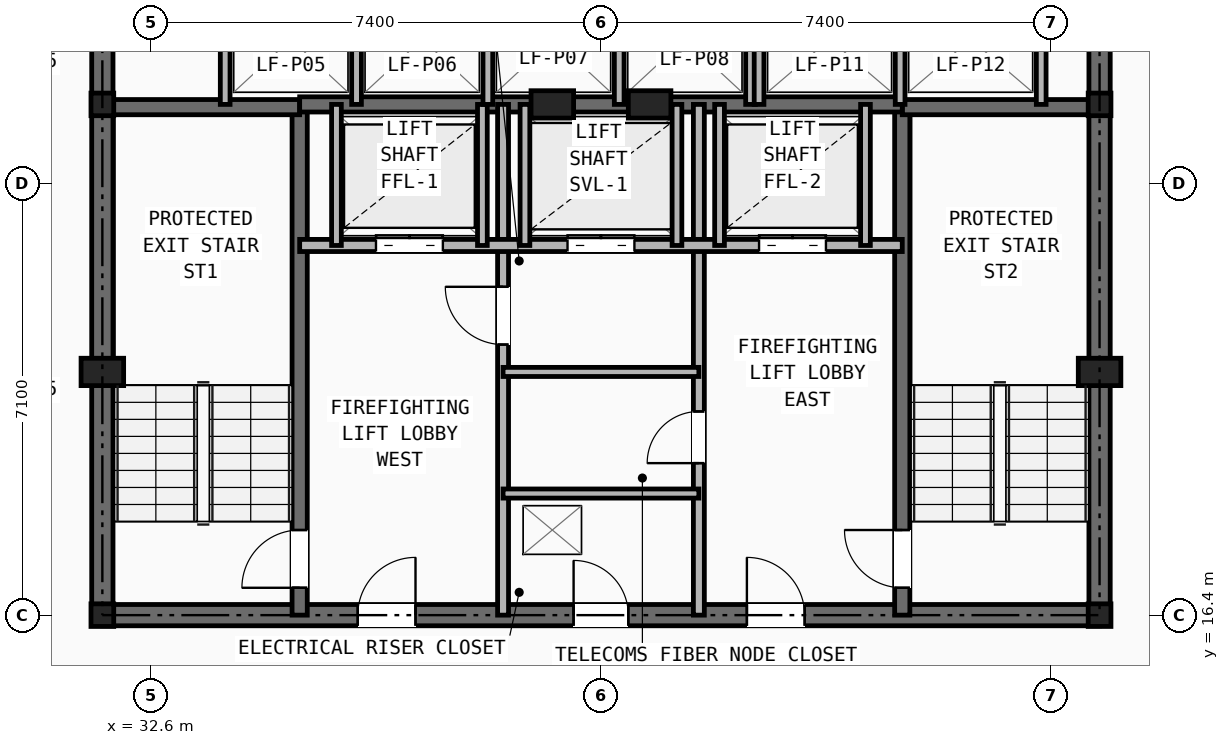
"""IFC4 building model, lengths in metres.
Left out: names, types, materials, properties, quantities, classifications, styles, units other than length and angle.
Written with IfcOpenShell. Run it as: python <this file> out.ifc"""

import sys

from ifc_helpers import new_model, si_unit, direction, frame, frame_2d, origin, origin_2d, place, context, subcontext, project, spatial, rectangle, i_section, extrude, element, fill, save


model = new_model("IFC4")
c1 = context("Model", 3, precision=1e-05, world=origin(), true_north=direction((0.0, 1.0)))
c2 = subcontext(c1, "Body", "Model", "MODEL_VIEW")
j1 = project(units=[si_unit("LENGTHUNIT", "METRE"), si_unit("PLANEANGLEUNIT", "RADIAN")], contexts=[c1])
p1 = place(None, origin())
s1 = spatial("IfcSite", under=j1, at=p1, CompositionType="ELEMENT")
p2 = place(p1, origin())
s2 = spatial("IfcBuilding", under=s1, at=p2, CompositionType="ELEMENT")
p3 = place(p2, frame((0.0, 0.0, 86.2)))
s3 = spatial("IfcBuildingStorey", under=s2, at=p3, CompositionType="ELEMENT", Elevation=86.2)
for number, where, z_axis, x_axis in (
    (1, (31.8, 16.4, 0.0), (0.0, 0.0, 1.0), (1.0, 0.0, 0.0)),
    (2, (48.2, 16.4, 0.0), (0.0, 0.0, 1.0), (1.0, 0.0, 0.0)),
    (3, (31.8, 24.8, 0.0), (0.0, 0.0, 1.0), (1.0, 0.0, 0.0)),
    (4, (48.2, 24.8, 0.0), (0.0, 0.0, 1.0), (1.0, 0.0, 0.0)),
):
    element("IfcColumn", number, at=place(p3, frame(where, z_axis=z_axis, x_axis=x_axis)), inside=s3, PredefinedType="COLUMN", context=c2, shape_type="SweptSolid", body=[
        extrude(i_section(OverallWidth=0.374, OverallDepth=0.372, WebThickness=0.016, FlangeThickness=0.026, at=origin_2d()), origin(), (0.0, 0.0, 1.0), 3.2),
    ])
for number, where, z_axis, x_axis in (
    (5, (31.8, 20.4, 0.0), (0.0, 0.0, 1.0), (1.0, 0.0, 0.0)),
    (6, (48.2, 20.4, 0.0), (0.0, 0.0, 1.0), (1.0, 0.0, 0.0)),
    (7, (39.2, 24.8, 0.0), (0.0, 0.0, 1.0), (1.0, 0.0, 0.0)),
    (8, (40.8, 24.8, 0.0), (0.0, 0.0, 1.0), (1.0, 0.0, 0.0)),
):
    element("IfcColumn", number, at=place(p3, frame(where, z_axis=z_axis, x_axis=x_axis)), inside=s3, PredefinedType="PILASTER", context=c2, shape_type="SweptSolid", body=[
        extrude(rectangle(XDim=0.7, YDim=0.45, at=origin_2d()), origin(), (0.0, 0.0, 1.0), 3.2),
    ])
p4 = place(p3, frame((31.8, 16.4, 0.0), z_axis=(0.0, 0.0, 1.0), x_axis=(1.0, 0.0, 0.0)))
e9 = element("IfcWall", 9, at=p4, inside=s3, PredefinedType="SHEAR", context=c2, shape_type="SweptSolid", body=[
    extrude(rectangle(XDim=16.4, YDim=0.35, at=frame_2d((8.2, 0.0))), origin(), (0.0, 0.0, 1.0), 2.97),
])
p5 = place(p4, frame((7.75, 0.0, 0.0)))
e10 = element("IfcOpeningElement", 10, at=p5, cuts=e9, PredefinedType="OPENING", context=c2, shape_type="SweptSolid", body=[
    extrude(rectangle(XDim=0.9, YDim=2.1, at=frame_2d((0.45, 1.05))), frame((0.0, 0.185, 0.0), z_axis=(0.0, -1.0, 0.0), x_axis=(1.0, 0.0, 0.0)), (0.0, 0.0, 1.0), 0.37),
])
p6 = place(p4, frame((4.2, 0.0, 0.0)))
e11 = element("IfcOpeningElement", 11, at=p6, cuts=e9, PredefinedType="OPENING", context=c2, shape_type="SweptSolid", body=[
    extrude(rectangle(XDim=0.95, YDim=2.1, at=frame_2d((0.475, 1.05))), frame((0.0, 0.185, 0.0), z_axis=(0.0, -1.0, 0.0), x_axis=(1.0, 0.0, 0.0)), (0.0, 0.0, 1.0), 0.37),
])
p7 = place(p4, frame((10.6, 0.0, 0.0)))
e12 = element("IfcOpeningElement", 12, at=p7, cuts=e9, PredefinedType="OPENING", context=c2, shape_type="SweptSolid", body=[
    extrude(rectangle(XDim=0.95, YDim=2.1, at=frame_2d((0.475, 1.05))), frame((0.0, 0.185, 0.0), z_axis=(0.0, -1.0, 0.0), x_axis=(1.0, 0.0, 0.0)), (0.0, 0.0, 1.0), 0.37),
])
p8 = place(p3, frame((31.8, 16.4, 0.0), z_axis=(0.0, 0.0, 1.0), x_axis=(0.0, 1.0, 0.0)))
e13 = element("IfcWall", 13, at=p8, inside=s3, PredefinedType="SHEAR", context=c2, shape_type="SweptSolid", body=[
    extrude(rectangle(XDim=14.8, YDim=0.35, at=frame_2d((7.4, 0.0))), origin(), (0.0, 0.0, 1.0), 2.97),
])
p9 = place(p8, frame((11.0, 0.0, 0.0)))
e14 = element("IfcOpeningElement", 14, at=p9, cuts=e13, PredefinedType="OPENING", context=c2, shape_type="SweptSolid", body=[
    extrude(rectangle(XDim=1.1, YDim=2.15, at=frame_2d((0.55, 1.075))), frame((0.0, 0.185, 0.0), z_axis=(0.0, -1.0, 0.0), x_axis=(1.0, 0.0, 0.0)), (0.0, 0.0, 1.0), 0.37),
])
p10 = place(p3, frame((48.2, 16.4, 0.0), z_axis=(0.0, 0.0, 1.0), x_axis=(0.0, 1.0, 0.0)))
e15 = element("IfcWall", 15, at=p10, inside=s3, PredefinedType="SHEAR", context=c2, shape_type="SweptSolid", body=[
    extrude(rectangle(XDim=14.8, YDim=0.35, at=frame_2d((7.4, 0.0))), origin(), (0.0, 0.0, 1.0), 2.97),
])
p11 = place(p10, frame((11.0, 0.0, 0.0)))
e16 = element("IfcOpeningElement", 16, at=p11, cuts=e15, PredefinedType="OPENING", context=c2, shape_type="SweptSolid", body=[
    extrude(rectangle(XDim=1.1, YDim=2.15, at=frame_2d((0.55, 1.075))), frame((0.0, 0.185, 0.0), z_axis=(0.0, -1.0, 0.0), x_axis=(1.0, 0.0, 0.0)), (0.0, 0.0, 1.0), 0.37),
])
p12 = place(p3, frame((35.045, 16.4, 0.0), z_axis=(0.0, 0.0, 1.0), x_axis=(0.0, 1.0, 0.0)))
e17 = element("IfcWall", 17, at=p12, inside=s3, PredefinedType="SHEAR", context=c2, shape_type="SweptSolid", body=[
    extrude(rectangle(XDim=8.4, YDim=0.25, at=frame_2d((4.2, 0.0))), origin(), (0.0, 0.0, 1.0), 2.97),
])
p13 = place(p12, frame((0.45, 0.0, 0.0)))
e18 = element("IfcOpeningElement", 18, at=p13, cuts=e17, PredefinedType="OPENING", context=c2, shape_type="SweptSolid", body=[
    extrude(rectangle(XDim=0.95, YDim=2.1, at=frame_2d((0.475, 1.05))), frame((0.0, 0.135, 0.0), z_axis=(0.0, -1.0, 0.0), x_axis=(1.0, 0.0, 0.0)), (0.0, 0.0, 1.0), 0.27),
])
p14 = place(p3, frame((31.8, 24.755, 0.0), z_axis=(0.0, 0.0, 1.0), x_axis=(1.0, 0.0, 0.0)))
e19 = element("IfcWall", 19, at=p14, inside=s3, PredefinedType="SHEAR", context=c2, shape_type="SweptSolid", body=[
    extrude(rectangle(XDim=3.245, YDim=0.25, at=frame_2d((1.623, 0.0))), origin(), (0.0, 0.0, 1.0), 2.97),
])
p15 = place(p3, frame((44.955, 16.4, 0.0), z_axis=(0.0, 0.0, 1.0), x_axis=(0.0, 1.0, 0.0)))
e20 = element("IfcWall", 20, at=p15, inside=s3, PredefinedType="SHEAR", context=c2, shape_type="SweptSolid", body=[
    extrude(rectangle(XDim=8.4, YDim=0.25, at=frame_2d((4.2, 0.0))), origin(), (0.0, 0.0, 1.0), 2.97),
])
p16 = place(p15, frame((0.45, 0.0, 0.0)))
e21 = element("IfcOpeningElement", 21, at=p16, cuts=e20, PredefinedType="OPENING", context=c2, shape_type="SweptSolid", body=[
    extrude(rectangle(XDim=0.95, YDim=2.1, at=frame_2d((0.475, 1.05))), frame((0.0, 0.135, 0.0), z_axis=(0.0, -1.0, 0.0), x_axis=(1.0, 0.0, 0.0)), (0.0, 0.0, 1.0), 0.27),
])
p17 = place(p3, frame((44.955, 24.755, 0.0), z_axis=(0.0, 0.0, 1.0), x_axis=(1.0, 0.0, 0.0)))
e22 = element("IfcWall", 22, at=p17, inside=s3, PredefinedType="SHEAR", context=c2, shape_type="SweptSolid", body=[
    extrude(rectangle(XDim=3.245, YDim=0.25, at=frame_2d((1.623, 0.0))), origin(), (0.0, 0.0, 1.0), 2.97),
])
p18 = place(p3, frame((35.045, 24.8, 0.0), z_axis=(0.0, 0.0, 1.0), x_axis=(1.0, 0.0, 0.0)))
e23 = element("IfcWall", 23, at=p18, inside=s3, PredefinedType="SHEAR", context=c2, shape_type="SweptSolid", body=[
    extrude(rectangle(XDim=9.91, YDim=0.25, at=frame_2d((4.955, 0.0))), origin(), (0.0, 0.0, 1.0), 2.97),
])
p19 = place(p3, frame((38.39, 16.4, 0.0), z_axis=(0.0, 0.0, 1.0), x_axis=(0.0, 1.0, 0.0)))
e24 = element("IfcWall", 24, at=p19, inside=s3, PredefinedType="PARTITIONING", context=c2, shape_type="SweptSolid", body=[
    extrude(rectangle(XDim=8.4, YDim=0.18, at=frame_2d((4.2, 0.0))), origin(), (0.0, 0.0, 1.0), 2.421),
])
p20 = place(p19, frame((4.45, 0.0, 0.0)))
e25 = element("IfcOpeningElement", 25, at=p20, cuts=e24, PredefinedType="OPENING", context=c2, shape_type="SweptSolid", body=[
    extrude(rectangle(XDim=0.95, YDim=2.1, at=frame_2d((0.475, 1.05))), frame((0.0, 0.1, 0.0), z_axis=(0.0, -1.0, 0.0), x_axis=(1.0, 0.0, 0.0)), (0.0, 0.0, 1.0), 0.2),
])
p21 = place(p3, frame((41.61, 16.4, 0.0), z_axis=(0.0, 0.0, 1.0), x_axis=(0.0, 1.0, 0.0)))
e26 = element("IfcWall", 26, at=p21, inside=s3, PredefinedType="PARTITIONING", context=c2, shape_type="SweptSolid", body=[
    extrude(rectangle(XDim=8.4, YDim=0.18, at=frame_2d((4.2, 0.0))), origin(), (0.0, 0.0, 1.0), 2.421),
])
p22 = place(p21, frame((2.5, 0.0, 0.0)))
e27 = element("IfcOpeningElement", 27, at=p22, cuts=e26, PredefinedType="OPENING", context=c2, shape_type="SweptSolid", body=[
    extrude(rectangle(XDim=0.85, YDim=2.05, at=frame_2d((0.425, 1.025))), frame((0.0, 0.1, 0.0), z_axis=(0.0, -1.0, 0.0), x_axis=(1.0, 0.0, 0.0)), (0.0, 0.0, 1.0), 0.2),
])
p23 = place(p3, frame((35.045, 22.48, 0.0), z_axis=(0.0, 0.0, 1.0), x_axis=(1.0, 0.0, 0.0)))
e28 = element("IfcWall", 28, at=p23, inside=s3, PredefinedType="SOLIDWALL", context=c2, shape_type="SweptSolid", body=[
    extrude(rectangle(XDim=9.91, YDim=0.2, at=frame_2d((4.955, 0.0))), origin(), (0.0, 0.0, 1.0), 2.97),
])
p24 = place(p23, frame((1.255, 0.0, 0.0)))
e29 = element("IfcOpeningElement", 29, at=p24, cuts=e28, PredefinedType="OPENING", context=c2, shape_type="SweptSolid", body=[
    extrude(rectangle(XDim=1.1, YDim=2.15, at=frame_2d((0.55, 1.075))), frame((0.0, 0.11, 0.0), z_axis=(0.0, -1.0, 0.0), x_axis=(1.0, 0.0, 0.0)), (0.0, 0.0, 1.0), 0.22),
])
p25 = place(p23, frame((7.555, 0.0, 0.0)))
e30 = element("IfcOpeningElement", 30, at=p25, cuts=e28, PredefinedType="OPENING", context=c2, shape_type="SweptSolid", body=[
    extrude(rectangle(XDim=1.1, YDim=2.15, at=frame_2d((0.55, 1.075))), frame((0.0, 0.11, 0.0), z_axis=(0.0, -1.0, 0.0), x_axis=(1.0, 0.0, 0.0)), (0.0, 0.0, 1.0), 0.22),
])
p26 = place(p23, frame((4.405, 0.0, 0.0)))
e31 = element("IfcOpeningElement", 31, at=p26, cuts=e28, PredefinedType="OPENING", context=c2, shape_type="SweptSolid", body=[
    extrude(rectangle(XDim=1.1, YDim=2.15, at=frame_2d((0.55, 1.075))), frame((0.0, 0.11, 0.0), z_axis=(0.0, -1.0, 0.0), x_axis=(1.0, 0.0, 0.0)), (0.0, 0.0, 1.0), 0.22),
])
for number, where, z_axis, x_axis in (
    (32, (38.39, 18.4, 0.0), (0.0, 0.0, 1.0), (1.0, 0.0, 0.0)),
    (33, (38.39, 20.4, 0.0), (0.0, 0.0, 1.0), (1.0, 0.0, 0.0)),
):
    element("IfcWall", number, at=place(p3, frame(where, z_axis=z_axis, x_axis=x_axis)), inside=s3, PredefinedType="PARTITIONING", context=c2, shape_type="SweptSolid", body=[
        extrude(rectangle(XDim=3.22, YDim=0.15, at=frame_2d((1.61, 0.0))), origin(), (0.0, 0.0, 1.0), 2.97),
    ])
for number, where, z_axis, x_axis in (
    (34, (35.65, 22.48, 0.0), (0.0, 0.0, 1.0), (0.0, 1.0, 0.0)),
    (35, (38.05, 22.48, 0.0), (0.0, 0.0, 1.0), (0.0, 1.0, 0.0)),
    (36, (41.95, 22.48, 0.0), (0.0, 0.0, 1.0), (0.0, 1.0, 0.0)),
    (37, (44.35, 22.48, 0.0), (0.0, 0.0, 1.0), (0.0, 1.0, 0.0)),
    (38, (38.75, 22.48, 0.0), (0.0, 0.0, 1.0), (0.0, 1.0, 0.0)),
    (39, (41.25, 22.48, 0.0), (0.0, 0.0, 1.0), (0.0, 1.0, 0.0)),
):
    element("IfcWall", number, at=place(p3, frame(where, z_axis=z_axis, x_axis=x_axis)), inside=s3, PredefinedType="SOLIDWALL", context=c2, shape_type="SweptSolid", body=[
        extrude(rectangle(XDim=2.32, YDim=0.16, at=frame_2d((1.16, 0.0))), origin(), (0.0, 0.0, 1.0), 2.97),
    ])
for number, where, z_axis, x_axis in (
    (40, (33.82, 24.8, 0.0), (0.0, 0.0, 1.0), (0.0, 1.0, 0.0)),
    (41, (35.98, 24.8, 0.0), (0.0, 0.0, 1.0), (0.0, 1.0, 0.0)),
    (42, (38.14, 24.8, 0.0), (0.0, 0.0, 1.0), (0.0, 1.0, 0.0)),
    (43, (40.3, 24.8, 0.0), (0.0, 0.0, 1.0), (0.0, 1.0, 0.0)),
    (44, (42.46, 24.8, 0.0), (0.0, 0.0, 1.0), (0.0, 1.0, 0.0)),
    (45, (42.6, 24.8, 0.0), (0.0, 0.0, 1.0), (0.0, 1.0, 0.0)),
    (46, (44.92, 24.8, 0.0), (0.0, 0.0, 1.0), (0.0, 1.0, 0.0)),
    (47, (47.24, 24.8, 0.0), (0.0, 0.0, 1.0), (0.0, 1.0, 0.0)),
):
    element("IfcWall", number, at=place(p3, frame(where, z_axis=z_axis, x_axis=x_axis)), inside=s3, PredefinedType="SOLIDWALL", context=c2, shape_type="SweptSolid", body=[
        extrude(rectangle(XDim=2.08, YDim=0.16, at=frame_2d((1.04, 0.0))), origin(), (0.0, 0.0, 1.0), 2.97),
    ])
p27 = place(p5, origin())
e48 = element("IfcDoor", 48, at=p27, inside=s3, OperationType="SINGLE_SWING_LEFT", PredefinedType="DOOR", context=c2, shape_type="SweptSolid", body=[
    extrude(rectangle(XDim=0.9, YDim=2.1, at=frame_2d((0.45, 1.05))), frame((0.0, 0.025, 0.0), z_axis=(0.0, -1.0, 0.0), x_axis=(1.0, 0.0, 0.0)), (0.0, 0.0, 1.0), 0.05),
])
fill(e10, e48)
p28 = place(p22, origin())
e49 = element("IfcDoor", 49, at=p28, inside=s3, OperationType="SINGLE_SWING_LEFT", PredefinedType="DOOR", context=c2, shape_type="SweptSolid", body=[
    extrude(rectangle(XDim=0.85, YDim=2.05, at=frame_2d((0.425, 1.025))), frame((0.0, 0.025, 0.0), z_axis=(0.0, -1.0, 0.0), x_axis=(1.0, 0.0, 0.0)), (0.0, 0.0, 1.0), 0.05),
])
fill(e27, e49)
p29 = place(p20, origin())
e50 = element("IfcDoor", 50, at=p29, inside=s3, OperationType="SINGLE_SWING_RIGHT", PredefinedType="DOOR", context=c2, shape_type="SweptSolid", body=[
    extrude(rectangle(XDim=0.95, YDim=2.1, at=frame_2d((0.475, 1.05))), frame((0.0, 0.025, 0.0), z_axis=(0.0, -1.0, 0.0), x_axis=(1.0, 0.0, 0.0)), (0.0, 0.0, 1.0), 0.05),
])
fill(e25, e50)
p30 = place(p13, origin())
e51 = element("IfcDoor", 51, at=p30, inside=s3, OperationType="SINGLE_SWING_LEFT", PredefinedType="DOOR", context=c2, shape_type="SweptSolid", body=[
    extrude(rectangle(XDim=0.95, YDim=2.1, at=frame_2d((0.475, 1.05))), frame((0.0, 0.025, 0.0), z_axis=(0.0, -1.0, 0.0), x_axis=(1.0, 0.0, 0.0)), (0.0, 0.0, 1.0), 0.05),
])
fill(e18, e51)
p31 = place(p16, origin())
e52 = element("IfcDoor", 52, at=p31, inside=s3, OperationType="SINGLE_SWING_RIGHT", PredefinedType="DOOR", context=c2, shape_type="SweptSolid", body=[
    extrude(rectangle(XDim=0.95, YDim=2.1, at=frame_2d((0.475, 1.05))), frame((0.0, 0.025, 0.0), z_axis=(0.0, -1.0, 0.0), x_axis=(1.0, 0.0, 0.0)), (0.0, 0.0, 1.0), 0.05),
])
fill(e21, e52)
p32 = place(p6, origin())
e53 = element("IfcDoor", 53, at=p32, inside=s3, OperationType="SINGLE_SWING_RIGHT", PredefinedType="DOOR", context=c2, shape_type="SweptSolid", body=[
    extrude(rectangle(XDim=0.95, YDim=2.1, at=frame_2d((0.475, 1.05))), frame((0.0, 0.025, 0.0), z_axis=(0.0, -1.0, 0.0), x_axis=(1.0, 0.0, 0.0)), (0.0, 0.0, 1.0), 0.05),
])
fill(e11, e53)
p33 = place(p7, origin())
e54 = element("IfcDoor", 54, at=p33, inside=s3, OperationType="SINGLE_SWING_LEFT", PredefinedType="DOOR", context=c2, shape_type="SweptSolid", body=[
    extrude(rectangle(XDim=0.95, YDim=2.1, at=frame_2d((0.475, 1.05))), frame((0.0, 0.025, 0.0), z_axis=(0.0, -1.0, 0.0), x_axis=(1.0, 0.0, 0.0)), (0.0, 0.0, 1.0), 0.05),
])
fill(e12, e54)
p34 = place(p24, origin())
e55 = element("IfcDoor", 55, at=p34, inside=s3, OperationType="DOUBLE_DOOR_SLIDING", PredefinedType="DOOR", context=c2, shape_type="SweptSolid", body=[
    extrude(rectangle(XDim=1.1, YDim=2.15, at=frame_2d((0.55, 1.075))), frame((0.0, 0.025, 0.0), z_axis=(0.0, -1.0, 0.0), x_axis=(1.0, 0.0, 0.0)), (0.0, 0.0, 1.0), 0.05),
])
fill(e29, e55)
p35 = place(p25, origin())
e56 = element("IfcDoor", 56, at=p35, inside=s3, OperationType="DOUBLE_DOOR_SLIDING", PredefinedType="DOOR", context=c2, shape_type="SweptSolid", body=[
    extrude(rectangle(XDim=1.1, YDim=2.15, at=frame_2d((0.55, 1.075))), frame((0.0, 0.025, 0.0), z_axis=(0.0, -1.0, 0.0), x_axis=(1.0, 0.0, 0.0)), (0.0, 0.0, 1.0), 0.05),
])
fill(e30, e56)
p36 = place(p26, origin())
e57 = element("IfcDoor", 57, at=p36, inside=s3, OperationType="DOUBLE_DOOR_SLIDING", PredefinedType="DOOR", context=c2, shape_type="SweptSolid", body=[
    extrude(rectangle(XDim=1.1, YDim=2.15, at=frame_2d((0.55, 1.075))), frame((0.0, 0.025, 0.0), z_axis=(0.0, -1.0, 0.0), x_axis=(1.0, 0.0, 0.0)), (0.0, 0.0, 1.0), 0.05),
])
fill(e31, e57)
save(model, sys.argv[1])
